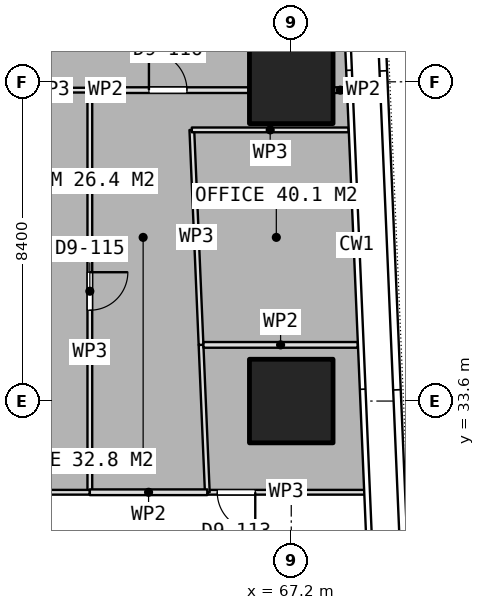
"""IFC4 building model, lengths in metres.
Left out: names, types, materials, properties, quantities, classifications, styles, units other than length and angle.
Written with IfcOpenShell. Run it as: python <this file> out.ifc"""

import sys

from ifc_helpers import new_model, si_unit, direction, frame, frame_2d, origin, origin_2d, place, context, subcontext, project, spatial, rectangle, extrude, element, fill, save


model = new_model("IFC4")
c1 = context("Model", 3, precision=1e-05, world=origin(), true_north=direction((0.0, 1.0)))
c2 = subcontext(c1, "Body", "Model", "MODEL_VIEW")
j1 = project(units=[si_unit("LENGTHUNIT", "METRE"), si_unit("PLANEANGLEUNIT", "RADIAN")], contexts=[c1])
p1 = place(None, origin())
s1 = spatial("IfcSite", under=j1, at=p1, CompositionType="ELEMENT")
p2 = place(p1, origin())
s2 = spatial("IfcBuilding", under=s1, at=p2, CompositionType="ELEMENT")
p3 = place(p2, frame((0.0, 0.0, 44.15)))
s3 = spatial("IfcBuildingStorey", under=s2, at=p3, CompositionType="ELEMENT", Elevation=44.15)
for number, where, z_axis, x_axis in (
    (1, (67.2, 33.6, 0.0), (0.0, 0.0, 1.0), (1.0, 0.0, 0.0)),
    (2, (67.2, 42.0, 0.0), (0.0, 0.0, 1.0), (1.0, 0.0, 0.0)),
):
    element("IfcColumn", number, at=place(p3, frame(where, z_axis=z_axis, x_axis=x_axis)), inside=s3, PredefinedType="COLUMN", context=c2, shape_type="SweptSolid", body=[
        extrude(rectangle(XDim=2.2, YDim=2.2, at=origin_2d()), origin(), (0.0, 0.0, 1.0), 3.75),
    ])
p4 = place(p3, frame((69.145, 31.2, 0.0), z_axis=(0.0, 0.0, 1.0), x_axis=(-1.0, 0.0, 0.0)))
e3 = element("IfcWall", 3, at=p4, inside=s3, PredefinedType="PARTITIONING", context=c2, shape_type="SweptSolid", body=[
    extrude(rectangle(XDim=4.154, YDim=0.125, at=frame_2d((2.077, 0.0))), origin(), (0.0, 0.0, 1.0), 3.5),
])
p5 = place(p4, frame((2.892, 0.0, 0.0)))
e4 = element("IfcOpeningElement", 4, at=p5, cuts=e3, PredefinedType="OPENING", context=c2, shape_type="SweptSolid", body=[
    extrude(rectangle(XDim=1.0, YDim=2.1, at=frame_2d((0.5, 1.05))), frame((0.0, 0.073, 0.0), z_axis=(0.0, -1.0, 0.0), x_axis=(1.0, 0.0, 0.0)), (0.0, 0.0, 1.0), 0.145),
])
p6 = place(p3, frame((64.991, 31.2, 0.0), z_axis=(0.0, 0.0, 1.0), x_axis=(-0.042506703932, 0.999096181617, 0.0)))
e5 = element("IfcWall", 5, at=p6, inside=s3, PredefinedType="PARTITIONING", context=c2, shape_type="SweptSolid", body=[
    extrude(rectangle(XDim=3.883, YDim=0.125, at=frame_2d((1.941, 0.0))), origin(), (0.0, 0.0, 1.0), 3.5),
])
p7 = place(p3, frame((64.826, 35.079, 0.0), z_axis=(0.0, 0.0, 1.0), x_axis=(-0.042737280095, 0.999086345062, 0.0)))
e6 = element("IfcWall", 6, at=p7, inside=s3, PredefinedType="PARTITIONING", context=c2, shape_type="SweptSolid", body=[
    extrude(rectangle(XDim=5.661, YDim=0.125, at=frame_2d((2.831, 0.0))), origin(), (0.0, 0.0, 1.0), 3.5),
])
p8 = place(p3, frame((64.584, 40.735, 0.0), z_axis=(0.0, 0.0, 1.0), x_axis=(1.0, 0.0, 0.0)))
e7 = element("IfcWall", 7, at=p8, inside=s3, PredefinedType="PARTITIONING", context=c2, shape_type="SweptSolid", body=[
    extrude(rectangle(XDim=4.124, YDim=0.125, at=frame_2d((2.062, 0.0))), origin(), (0.0, 0.0, 1.0), 3.5),
])
p9 = place(p3, frame((59.92, 41.781, 0.0), z_axis=(0.0, 0.0, 1.0), x_axis=(1.0, 0.0, 0.0)))
e8 = element("IfcWall", 8, at=p9, inside=s3, PredefinedType="PARTITIONING", context=c2, shape_type="SweptSolid", body=[
    extrude(rectangle(XDim=1.98, YDim=0.125, at=frame_2d((0.99, 0.0))), origin(), (0.0, 0.0, 1.0), 3.5),
])
p10 = place(p3, frame((61.9, 41.781, 0.0), z_axis=(0.0, 0.0, 1.0), x_axis=(0.0, -1.0, 0.0)))
e9 = element("IfcWall", 9, at=p10, inside=s3, PredefinedType="PARTITIONING", context=c2, shape_type="SweptSolid", body=[
    extrude(rectangle(XDim=10.581, YDim=0.125, at=frame_2d((5.291, 0.0))), origin(), (0.0, 0.0, 1.0), 3.5),
])
p11 = place(p10, frame((4.791, 0.0, 0.0)))
e10 = element("IfcOpeningElement", 10, at=p11, cuts=e9, PredefinedType="OPENING", context=c2, shape_type="SweptSolid", body=[
    extrude(rectangle(XDim=1.0, YDim=2.1, at=frame_2d((0.5, 1.05))), frame((0.0, 0.073, 0.0), z_axis=(0.0, -1.0, 0.0), x_axis=(1.0, 0.0, 0.0)), (0.0, 0.0, 1.0), 0.145),
])
p12 = place(p3, frame((61.9, 31.2, 0.0), z_axis=(0.0, 0.0, 1.0), x_axis=(-1.0, 0.0, 0.0)))
e11 = element("IfcWall", 11, at=p12, inside=s3, PredefinedType="PARTITIONING", context=c2, shape_type="SweptSolid", body=[
    extrude(rectangle(XDim=2.7, YDim=0.125, at=frame_2d((1.35, 0.0))), origin(), (0.0, 0.0, 1.0), 3.5),
])
p13 = place(p3, frame((64.991, 31.2, 0.0), z_axis=(0.0, 0.0, 1.0), x_axis=(-1.0, 0.0, 0.0)))
e12 = element("IfcWall", 12, at=p13, inside=s3, PredefinedType="PARTITIONING", context=c2, shape_type="SweptSolid", body=[
    extrude(rectangle(XDim=3.091, YDim=0.15, at=frame_2d((1.545, 0.0))), origin(), (0.0, 0.0, 1.0), 3.5),
])
p14 = place(p3, frame((61.9, 41.781, 0.0), z_axis=(0.0, 0.0, 1.0), x_axis=(1.0, 0.0, 0.0)))
e13 = element("IfcWall", 13, at=p14, inside=s3, PredefinedType="PARTITIONING", context=c2, shape_type="SweptSolid", body=[
    extrude(rectangle(XDim=4.18, YDim=0.15, at=frame_2d((2.09, 0.0))), origin(), (0.0, 0.0, 1.0), 3.5),
])
p15 = place(p14, frame((1.555, 0.0, 0.0)))
e14 = element("IfcOpeningElement", 14, at=p15, cuts=e13, PredefinedType="OPENING", context=c2, shape_type="SweptSolid", body=[
    extrude(rectangle(XDim=1.0, YDim=2.1, at=frame_2d((0.5, 1.05))), frame((0.0, 0.085, 0.0), z_axis=(0.0, -1.0, 0.0), x_axis=(1.0, 0.0, 0.0)), (0.0, 0.0, 1.0), 0.17),
])
p16 = place(p3, frame((68.32, 41.781, 0.0), z_axis=(0.0, 0.0, 1.0), x_axis=(1.0, 0.0, 0.0)))
e15 = element("IfcWall", 15, at=p16, inside=s3, PredefinedType="PARTITIONING", context=c2, shape_type="SweptSolid", body=[
    extrude(rectangle(XDim=0.343, YDim=0.15, at=frame_2d((0.171, 0.0))), origin(), (0.0, 0.0, 1.0), 3.5),
])
p17 = place(p3, frame((64.889, 35.078, 0.0), z_axis=(0.0, 0.0, 1.0), x_axis=(1.0, 0.0, 0.0)))
e16 = element("IfcWall", 16, at=p17, inside=s3, PredefinedType="PARTITIONING", context=c2, shape_type="SweptSolid", body=[
    extrude(rectangle(XDim=4.061, YDim=0.15, at=frame_2d((2.031, 0.0))), origin(), (0.0, 0.0, 1.0), 3.5),
])
p18 = place(p5, origin())
e17 = element("IfcDoor", 17, at=p18, inside=s3, OperationType="SINGLE_SWING_LEFT", PredefinedType="DOOR", context=c2, shape_type="SweptSolid", body=[
    extrude(rectangle(XDim=1.0, YDim=2.1, at=frame_2d((0.5, 1.05))), frame((0.0, 0.025, 0.0), z_axis=(0.0, -1.0, 0.0), x_axis=(1.0, 0.0, 0.0)), (0.0, 0.0, 1.0), 0.05),
])
fill(e4, e17)
p19 = place(p11, origin())
e18 = element("IfcDoor", 18, at=p19, inside=s3, OperationType="SINGLE_SWING_LEFT", PredefinedType="DOOR", context=c2, shape_type="SweptSolid", body=[
    extrude(rectangle(XDim=1.0, YDim=2.1, at=frame_2d((0.5, 1.05))), frame((0.0, 0.025, 0.0), z_axis=(0.0, -1.0, 0.0), x_axis=(1.0, 0.0, 0.0)), (0.0, 0.0, 1.0), 0.05),
])
fill(e10, e18)
p20 = place(p15, origin())
e19 = element("IfcDoor", 19, at=p20, inside=s3, OperationType="SINGLE_SWING_LEFT", PredefinedType="DOOR", context=c2, shape_type="SweptSolid", body=[
    extrude(rectangle(XDim=1.0, YDim=2.1, at=frame_2d((0.5, 1.05))), frame((0.0, 0.025, 0.0), z_axis=(0.0, -1.0, 0.0), x_axis=(1.0, 0.0, 0.0)), (0.0, 0.0, 1.0), 0.05),
])
fill(e14, e19)
save(model, sys.argv[1])
